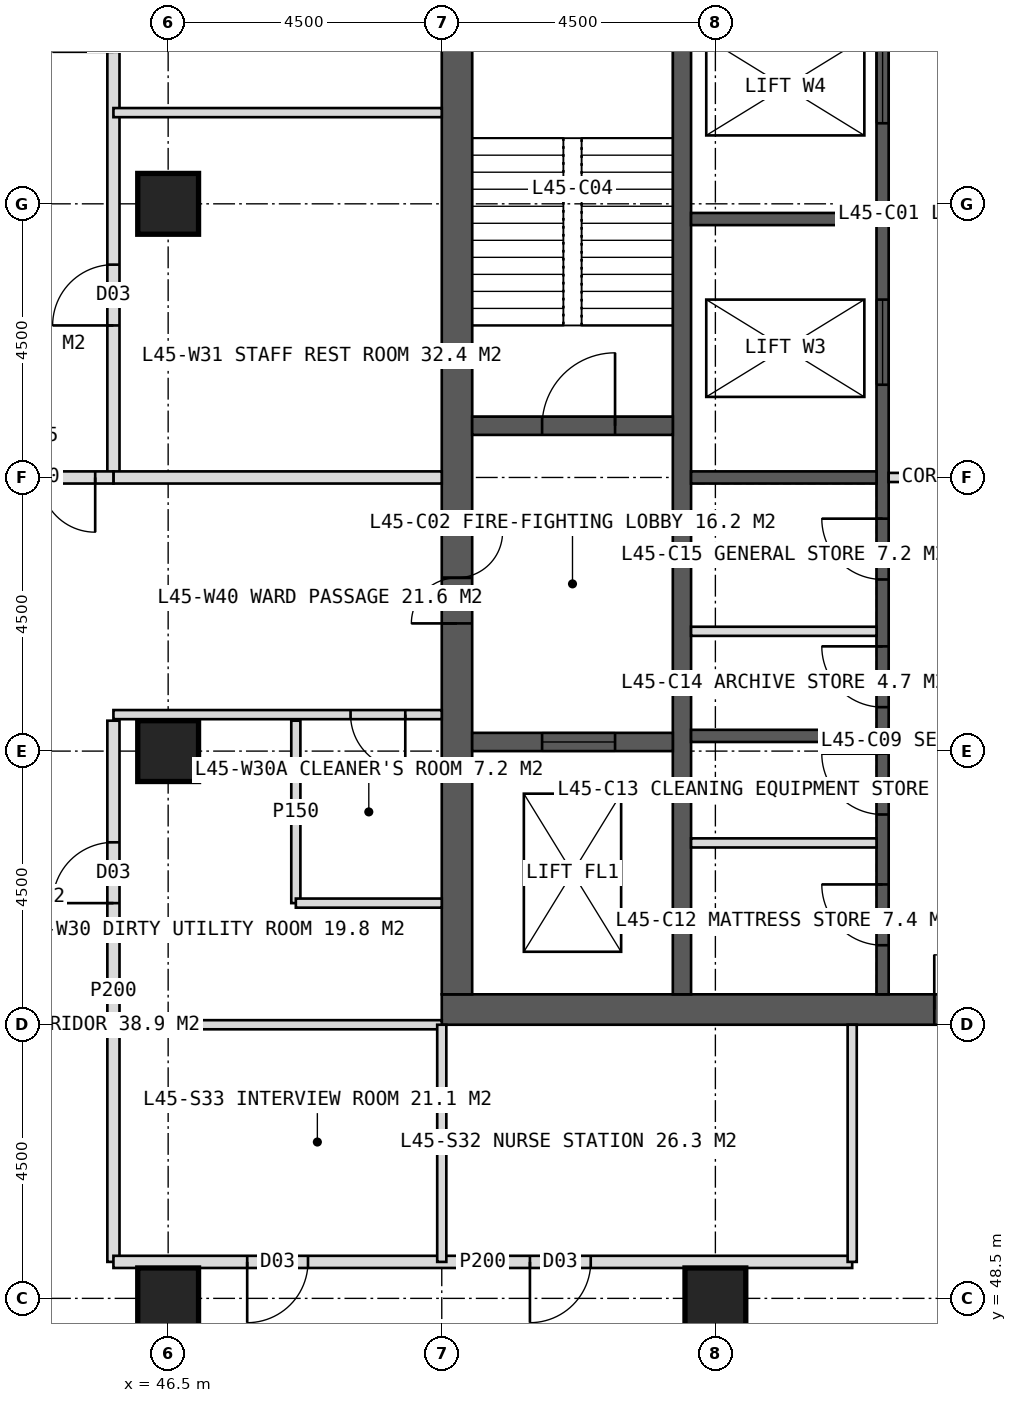
"""IFC4 building model, lengths in metres.
Left out: names, types, materials, properties, quantities, classifications, styles, units other than length and angle.
Written with IfcOpenShell. Run it as: python <this file> out.ifc"""

import sys

from ifc_helpers import new_model, si_unit, direction, frame, frame_2d, origin, origin_2d, place, context, subcontext, project, spatial, rectangle, hollow_rectangle, extrude, element, fill, save


model = new_model("IFC4")
c1 = context("Model", 3, precision=1e-05, world=origin(), true_north=direction((0.0, 1.0)))
c2 = subcontext(c1, "Body", "Model", "MODEL_VIEW")
j1 = project(units=[si_unit("LENGTHUNIT", "METRE"), si_unit("PLANEANGLEUNIT", "RADIAN")], contexts=[c1])
p1 = place(None, origin())
s1 = spatial("IfcSite", under=j1, at=p1, CompositionType="ELEMENT")
p2 = place(p1, origin())
s2 = spatial("IfcBuilding", under=s1, at=p2, CompositionType="ELEMENT")
p3 = place(p2, frame((0.0, 0.0, 189.0)))
s3 = spatial("IfcBuildingStorey", under=s2, at=p3, CompositionType="ELEMENT", Elevation=189.0)
p4 = place(p3, frame((51.0, 53.25, 0.0), z_axis=(0.0, 0.0, 1.0), x_axis=(1.0, 0.0, 0.0)))
e1 = element("IfcWall", 1, at=p4, inside=s3, PredefinedType="SHEAR", context=c2, shape_type="SweptSolid", body=[
    extrude(rectangle(XDim=18.0, YDim=0.5, at=frame_2d((9.0, 0.0))), origin(), (0.0, 0.0, 1.0), 4.0),
])
p5 = place(p4, frame((8.1, 0.0, 0.0)))
e2 = element("IfcOpeningElement", 2, at=p5, cuts=e1, PredefinedType="OPENING", context=c2, shape_type="SweptSolid", body=[
    extrude(rectangle(XDim=1.8, YDim=2.2, at=frame_2d((0.9, 1.1))), frame((0.0, 0.26, 0.0), z_axis=(0.0, -1.0, 0.0), x_axis=(1.0, 0.0, 0.0)), (0.0, 0.0, 1.0), 0.52),
])
p6 = place(p3, frame((51.25, 53.5, 0.0), z_axis=(0.0, 0.0, 1.0), x_axis=(0.0, 1.0, 0.0)))
e3 = element("IfcWall", 3, at=p6, inside=s3, PredefinedType="SHEAR", context=c2, shape_type="SweptSolid", body=[
    extrude(rectangle(XDim=17.0, YDim=0.5, at=frame_2d((8.5, 0.0))), origin(), (0.0, 0.0, 1.0), 4.0),
])
p7 = place(p6, frame((6.1, 0.0, 0.0)))
e4 = element("IfcOpeningElement", 4, at=p7, cuts=e3, PredefinedType="OPENING", context=c2, shape_type="SweptSolid", body=[
    extrude(rectangle(XDim=1.5, YDim=2.2, at=frame_2d((0.75, 1.1))), frame((0.0, 0.26, 0.0), z_axis=(0.0, -1.0, 0.0), x_axis=(1.0, 0.0, 0.0)), (0.0, 0.0, 1.0), 0.52),
])
p8 = place(p3, frame((54.95, 53.5, 0.0), z_axis=(0.0, 0.0, 1.0), x_axis=(0.0, 1.0, 0.0)))
e5 = element("IfcWall", 5, at=p8, inside=s3, PredefinedType="SHEAR", context=c2, shape_type="SweptSolid", body=[
    extrude(rectangle(XDim=17.0, YDim=0.3, at=frame_2d((8.5, 0.0))), origin(), (0.0, 0.0, 1.0), 4.0),
])
p9 = place(p3, frame((58.25, 53.5, 0.0), z_axis=(0.0, 0.0, 1.0), x_axis=(0.0, 1.0, 0.0)))
e6 = element("IfcWall", 6, at=p9, inside=s3, PredefinedType="SHEAR", context=c2, shape_type="SweptSolid", body=[
    extrude(rectangle(XDim=17.0, YDim=0.2, at=frame_2d((8.5, 0.0))), origin(), (0.0, 0.0, 1.0), 4.0),
])
p10 = place(p9, frame((0.808, 0.0, 0.0)))
e7 = element("IfcOpeningElement", 7, at=p10, cuts=e6, PredefinedType="OPENING", context=c2, shape_type="SweptSolid", body=[
    extrude(rectangle(XDim=1.0, YDim=2.1, at=frame_2d((0.5, 1.05))), frame((0.0, 0.11, 0.0), z_axis=(0.0, -1.0, 0.0), x_axis=(1.0, 0.0, 0.0)), (0.0, 0.0, 1.0), 0.22),
])
p11 = place(p9, frame((2.958, 0.0, 0.0)))
e8 = element("IfcOpeningElement", 8, at=p11, cuts=e6, PredefinedType="OPENING", context=c2, shape_type="SweptSolid", body=[
    extrude(rectangle(XDim=1.0, YDim=2.1, at=frame_2d((0.5, 1.05))), frame((0.0, 0.11, 0.0), z_axis=(0.0, -1.0, 0.0), x_axis=(1.0, 0.0, 0.0)), (0.0, 0.0, 1.0), 0.22),
])
p12 = place(p9, frame((4.722, 0.0, 0.0)))
e9 = element("IfcOpeningElement", 9, at=p12, cuts=e6, PredefinedType="OPENING", context=c2, shape_type="SweptSolid", body=[
    extrude(rectangle(XDim=1.0, YDim=2.1, at=frame_2d((0.5, 1.05))), frame((0.0, 0.11, 0.0), z_axis=(0.0, -1.0, 0.0), x_axis=(1.0, 0.0, 0.0)), (0.0, 0.0, 1.0), 0.22),
])
p13 = place(p9, frame((6.823, 0.0, 0.0)))
e10 = element("IfcOpeningElement", 10, at=p13, cuts=e6, PredefinedType="OPENING", context=c2, shape_type="SweptSolid", body=[
    extrude(rectangle(XDim=1.0, YDim=2.1, at=frame_2d((0.5, 1.05))), frame((0.0, 0.11, 0.0), z_axis=(0.0, -1.0, 0.0), x_axis=(1.0, 0.0, 0.0)), (0.0, 0.0, 1.0), 0.22),
])
p14 = place(p9, frame((10.025, 0.0, 0.0)))
e11 = element("IfcOpeningElement", 11, at=p14, cuts=e6, PredefinedType="OPENING", context=c2, shape_type="SweptSolid", body=[
    extrude(rectangle(XDim=1.4, YDim=2.2, at=frame_2d((0.7, 1.1))), frame((0.0, 0.11, 0.0), z_axis=(0.0, -1.0, 0.0), x_axis=(1.0, 0.0, 0.0)), (0.0, 0.0, 1.0), 0.22),
])
p15 = place(p9, frame((14.325, 0.0, 0.0)))
e12 = element("IfcOpeningElement", 12, at=p15, cuts=e6, PredefinedType="OPENING", context=c2, shape_type="SweptSolid", body=[
    extrude(rectangle(XDim=1.4, YDim=2.2, at=frame_2d((0.7, 1.1))), frame((0.0, 0.11, 0.0), z_axis=(0.0, -1.0, 0.0), x_axis=(1.0, 0.0, 0.0)), (0.0, 0.0, 1.0), 0.22),
])
for number, where, z_axis, x_axis in (
    (13, (55.1, 57.75, 0.0), (0.0, 0.0, 1.0), (1.0, 0.0, 0.0)),
    (14, (55.1, 62.0, 0.0), (0.0, 0.0, 1.0), (1.0, 0.0, 0.0)),
    (15, (55.1, 66.25, 0.0), (0.0, 0.0, 1.0), (1.0, 0.0, 0.0)),
):
    element("IfcWall", number, at=place(p3, frame(where, z_axis=z_axis, x_axis=x_axis)), inside=s3, PredefinedType="SHEAR", context=c2, shape_type="SweptSolid", body=[
        extrude(rectangle(XDim=3.05, YDim=0.2, at=frame_2d((1.525, 0.0))), origin(), (0.0, 0.0, 1.0), 4.0),
    ])
p16 = place(p3, frame((51.5, 62.85, 0.0), z_axis=(0.0, 0.0, 1.0), x_axis=(1.0, 0.0, 0.0)))
e16 = element("IfcWall", 16, at=p16, inside=s3, PredefinedType="SHEAR", context=c2, shape_type="SweptSolid", body=[
    extrude(rectangle(XDim=3.3, YDim=0.3, at=frame_2d((1.65, 0.0))), origin(), (0.0, 0.0, 1.0), 4.0),
])
p17 = place(p16, frame((1.15, 0.0, 0.0)))
e17 = element("IfcOpeningElement", 17, at=p17, cuts=e16, PredefinedType="OPENING", context=c2, shape_type="SweptSolid", body=[
    extrude(rectangle(XDim=1.2, YDim=2.1, at=frame_2d((0.6, 1.05))), frame((0.0, 0.16, 0.0), z_axis=(0.0, -1.0, 0.0), x_axis=(1.0, 0.0, 0.0)), (0.0, 0.0, 1.0), 0.32),
])
p18 = place(p3, frame((51.5, 57.65, 0.0), z_axis=(0.0, 0.0, 1.0), x_axis=(1.0, 0.0, 0.0)))
e18 = element("IfcWall", 18, at=p18, inside=s3, PredefinedType="SHEAR", context=c2, shape_type="SweptSolid", body=[
    extrude(rectangle(XDim=3.3, YDim=0.3, at=frame_2d((1.65, 0.0))), origin(), (0.0, 0.0, 1.0), 4.0),
])
p19 = place(p18, frame((1.15, 0.0, 0.0)))
e19 = element("IfcOpeningElement", 19, at=p19, cuts=e18, PredefinedType="OPENING", context=c2, shape_type="SweptSolid", body=[
    extrude(rectangle(XDim=1.2, YDim=2.2, at=frame_2d((0.6, 1.1))), frame((0.0, 0.16, 0.0), z_axis=(0.0, -1.0, 0.0), x_axis=(1.0, 0.0, 0.0)), (0.0, 0.0, 1.0), 0.32),
])
for number, where, z_axis, x_axis in (
    (20, (46.5, 48.5, 0.0), (0.0, 0.0, 1.0), (1.0, 0.0, 0.0)),
    (21, (55.5, 48.5, 0.0), (0.0, 0.0, 1.0), (1.0, 0.0, 0.0)),
    (22, (46.5, 57.5, 0.0), (0.0, 0.0, 1.0), (1.0, 0.0, 0.0)),
    (23, (46.5, 66.5, 0.0), (0.0, 0.0, 1.0), (1.0, 0.0, 0.0)),
):
    element("IfcColumn", number, at=place(p3, frame(where, z_axis=z_axis, x_axis=x_axis)), inside=s3, PredefinedType="COLUMN", context=c2, shape_type="SweptSolid", body=[
        extrude(hollow_rectangle(XDim=1.0, YDim=1.0, WallThickness=0.1, at=origin_2d()), origin(), (0.0, 0.0, 1.0), 4.0),
    ])
p20 = place(p3, frame((51.0, 53.0, 0.0), z_axis=(0.0, 0.0, 1.0), x_axis=(-1.0, 0.0, 0.0)))
e24 = element("IfcWall", 24, at=p20, inside=s3, PredefinedType="PARTITIONING", context=c2, shape_type="SweptSolid", body=[
    extrude(rectangle(XDim=5.4, YDim=0.15, at=frame_2d((2.7, 0.0))), origin(), (0.0, 0.0, 1.0), 3.75),
])
p21 = place(p3, frame((45.6, 49.1, 0.0), z_axis=(0.0, 0.0, 1.0), x_axis=(0.0, 1.0, 0.0)))
e25 = element("IfcWall", 25, at=p21, inside=s3, PredefinedType="PARTITIONING", context=c2, shape_type="SweptSolid", body=[
    extrude(rectangle(XDim=8.9, YDim=0.2, at=frame_2d((4.45, 0.0))), origin(), (0.0, 0.0, 1.0), 3.75),
])
p22 = place(p21, frame((5.9, 0.0, 0.0)))
e26 = element("IfcOpeningElement", 26, at=p22, cuts=e25, PredefinedType="OPENING", context=c2, shape_type="SweptSolid", body=[
    extrude(rectangle(XDim=1.0, YDim=2.1, at=frame_2d((0.5, 1.05))), frame((0.0, 0.11, 0.0), z_axis=(0.0, -1.0, 0.0), x_axis=(1.0, 0.0, 0.0)), (0.0, 0.0, 1.0), 0.22),
])
p23 = place(p3, frame((45.6, 62.0, 0.0), z_axis=(0.0, 0.0, 1.0), x_axis=(0.0, 1.0, 0.0)))
e27 = element("IfcWall", 27, at=p23, inside=s3, PredefinedType="PARTITIONING", context=c2, shape_type="SweptSolid", body=[
    extrude(rectangle(XDim=14.4, YDim=0.2, at=frame_2d((7.2, 0.0))), origin(), (0.0, 0.0, 1.0), 3.75),
])
p24 = place(p23, frame((2.5, 0.0, 0.0)))
e28 = element("IfcOpeningElement", 28, at=p24, cuts=e27, PredefinedType="OPENING", context=c2, shape_type="SweptSolid", body=[
    extrude(rectangle(XDim=1.0, YDim=2.1, at=frame_2d((0.5, 1.05))), frame((0.0, 0.11, 0.0), z_axis=(0.0, -1.0, 0.0), x_axis=(1.0, 0.0, 0.0)), (0.0, 0.0, 1.0), 0.22),
])
p25 = place(p23, frame((7.0, 0.0, 0.0)))
e29 = element("IfcOpeningElement", 29, at=p25, cuts=e27, PredefinedType="OPENING", context=c2, shape_type="SweptSolid", body=[
    extrude(rectangle(XDim=1.0, YDim=2.1, at=frame_2d((0.5, 1.05))), frame((0.0, 0.11, 0.0), z_axis=(0.0, -1.0, 0.0), x_axis=(1.0, 0.0, 0.0)), (0.0, 0.0, 1.0), 0.22),
])
p26 = place(p23, frame((11.2, 0.0, 0.0)))
e30 = element("IfcOpeningElement", 30, at=p26, cuts=e27, PredefinedType="OPENING", context=c2, shape_type="SweptSolid", body=[
    extrude(rectangle(XDim=1.0, YDim=2.1, at=frame_2d((0.5, 1.05))), frame((0.0, 0.11, 0.0), z_axis=(0.0, -1.0, 0.0), x_axis=(1.0, 0.0, 0.0)), (0.0, 0.0, 1.0), 0.22),
])
p27 = place(p3, frame((51.0, 58.1, 0.0), z_axis=(0.0, 0.0, 1.0), x_axis=(-1.0, 0.0, 0.0)))
e31 = element("IfcWall", 31, at=p27, inside=s3, PredefinedType="PARTITIONING", context=c2, shape_type="SweptSolid", body=[
    extrude(rectangle(XDim=5.4, YDim=0.15, at=frame_2d((2.7, 0.0))), origin(), (0.0, 0.0, 1.0), 3.75),
])
p28 = place(p27, frame((0.6, 0.0, 0.0)))
e32 = element("IfcOpeningElement", 32, at=p28, cuts=e31, PredefinedType="OPENING", context=c2, shape_type="SweptSolid", body=[
    extrude(rectangle(XDim=0.9, YDim=2.1, at=frame_2d((0.45, 1.05))), frame((0.0, 0.085, 0.0), z_axis=(0.0, -1.0, 0.0), x_axis=(1.0, 0.0, 0.0)), (0.0, 0.0, 1.0), 0.17),
])
p29 = place(p3, frame((51.0, 62.0, 0.0), z_axis=(0.0, 0.0, 1.0), x_axis=(-1.0, 0.0, 0.0)))
e33 = element("IfcWall", 33, at=p29, inside=s3, PredefinedType="SOLIDWALL", context=c2, shape_type="SweptSolid", body=[
    extrude(rectangle(XDim=5.4, YDim=0.2, at=frame_2d((2.7, 0.0))), origin(), (0.0, 0.0, 1.0), 2.95),
])
p30 = place(p3, frame((51.0, 68.0, 0.0), z_axis=(0.0, 0.0, 1.0), x_axis=(-1.0, 0.0, 0.0)))
e34 = element("IfcWall", 34, at=p30, inside=s3, PredefinedType="PARTITIONING", context=c2, shape_type="SweptSolid", body=[
    extrude(rectangle(XDim=5.4, YDim=0.15, at=frame_2d((2.7, 0.0))), origin(), (0.0, 0.0, 1.0), 3.75),
])
p31 = place(p3, frame((48.6, 55.0, 0.0), z_axis=(0.0, 0.0, 1.0), x_axis=(0.0, 1.0, 0.0)))
e35 = element("IfcWall", 35, at=p31, inside=s3, PredefinedType="PARTITIONING", context=c2, shape_type="SweptSolid", body=[
    extrude(rectangle(XDim=3.0, YDim=0.15, at=frame_2d((1.5, 0.0))), origin(), (0.0, 0.0, 1.0), 3.75),
])
p32 = place(p3, frame((51.0, 55.0, 0.0), z_axis=(0.0, 0.0, 1.0), x_axis=(-1.0, 0.0, 0.0)))
e36 = element("IfcWall", 36, at=p32, inside=s3, PredefinedType="PARTITIONING", context=c2, shape_type="SweptSolid", body=[
    extrude(rectangle(XDim=2.4, YDim=0.15, at=frame_2d((1.2, 0.0))), origin(), (0.0, 0.0, 1.0), 3.75),
])
p33 = place(p3, frame((57.75, 49.1, 0.0), z_axis=(0.0, 0.0, 1.0), x_axis=(-1.0, 0.0, 0.0)))
e37 = element("IfcWall", 37, at=p33, inside=s3, PredefinedType="PARTITIONING", context=c2, shape_type="SweptSolid", body=[
    extrude(rectangle(XDim=12.15, YDim=0.2, at=frame_2d((6.075, 0.0))), origin(), (0.0, 0.0, 1.0), 3.75),
])
p34 = place(p33, frame((4.3, 0.0, 0.0)))
e38 = element("IfcOpeningElement", 38, at=p34, cuts=e37, PredefinedType="OPENING", context=c2, shape_type="SweptSolid", body=[
    extrude(rectangle(XDim=1.0, YDim=2.1, at=frame_2d((0.5, 1.05))), frame((0.0, 0.11, 0.0), z_axis=(0.0, -1.0, 0.0), x_axis=(1.0, 0.0, 0.0)), (0.0, 0.0, 1.0), 0.22),
])
p35 = place(p33, frame((8.95, 0.0, 0.0)))
e39 = element("IfcOpeningElement", 39, at=p35, cuts=e37, PredefinedType="OPENING", context=c2, shape_type="SweptSolid", body=[
    extrude(rectangle(XDim=1.0, YDim=2.1, at=frame_2d((0.5, 1.05))), frame((0.0, 0.11, 0.0), z_axis=(0.0, -1.0, 0.0), x_axis=(1.0, 0.0, 0.0)), (0.0, 0.0, 1.0), 0.22),
])
for number, where, z_axis, x_axis in (
    (40, (57.75, 53.0, 0.0), (0.0, 0.0, 1.0), (0.0, -1.0, 0.0)),
    (41, (51.0, 53.0, 0.0), (0.0, 0.0, 1.0), (0.0, -1.0, 0.0)),
):
    element("IfcWall", number, at=place(p3, frame(where, z_axis=z_axis, x_axis=x_axis)), inside=s3, PredefinedType="PARTITIONING", context=c2, shape_type="SweptSolid", body=[
        extrude(rectangle(XDim=3.9, YDim=0.15, at=frame_2d((1.95, 0.0))), origin(), (0.0, 0.0, 1.0), 3.75),
    ])
p36 = place(p3, frame((45.6, 62.0, 0.0), z_axis=(0.0, 0.0, 1.0), x_axis=(-1.0, 0.0, 0.0)))
e42 = element("IfcWall", 42, at=p36, inside=s3, PredefinedType="SOLIDWALL", context=c2, shape_type="SweptSolid", body=[
    extrude(rectangle(XDim=2.7, YDim=0.2, at=frame_2d((1.35, 0.0))), origin(), (0.0, 0.0, 1.0), 2.95),
])
p37 = place(p36, frame((0.3, 0.0, 0.0)))
e43 = element("IfcOpeningElement", 43, at=p37, cuts=e42, PredefinedType="OPENING", context=c2, shape_type="SweptSolid", body=[
    extrude(rectangle(XDim=1.8, YDim=2.2, at=frame_2d((0.9, 1.1))), frame((0.0, 0.11, 0.0), z_axis=(0.0, -1.0, 0.0), x_axis=(1.0, 0.0, 0.0)), (0.0, 0.0, 1.0), 0.22),
])
for number, where, z_axis, x_axis in (
    (44, (55.1, 55.99, 0.0), (0.0, 0.0, 1.0), (1.0, 0.0, 0.0)),
    (45, (55.1, 59.47, 0.0), (0.0, 0.0, 1.0), (1.0, 0.0, 0.0)),
):
    element("IfcWall", number, at=place(p3, frame(where, z_axis=z_axis, x_axis=x_axis)), inside=s3, PredefinedType="PARTITIONING", context=c2, shape_type="SweptSolid", body=[
        extrude(rectangle(XDim=3.05, YDim=0.15, at=frame_2d((1.525, 0.0))), origin(), (0.0, 0.0, 1.0), 3.75),
    ])
p38 = place(p3, frame((58.35, 62.0, 0.0), z_axis=(0.0, 0.0, 1.0), x_axis=(1.0, 0.0, 0.0)))
e46 = element("IfcWall", 46, at=p38, inside=s3, PredefinedType="PARTITIONING", context=c2, shape_type="SweptSolid", body=[
    extrude(rectangle(XDim=3.3, YDim=0.15, at=frame_2d((1.65, 0.0))), origin(), (0.0, 0.0, 1.0), 3.75),
])
p39 = place(p28, origin())
e47 = element("IfcDoor", 47, at=p39, inside=s3, OperationType="SINGLE_SWING_LEFT", PredefinedType="DOOR", context=c2, shape_type="SweptSolid", body=[
    extrude(rectangle(XDim=0.9, YDim=2.1, at=frame_2d((0.45, 1.05))), frame((0.0, 0.025, 0.0), z_axis=(0.0, -1.0, 0.0), x_axis=(1.0, 0.0, 0.0)), (0.0, 0.0, 1.0), 0.05),
])
fill(e32, e47)
p40 = place(p22, origin())
e48 = element("IfcDoor", 48, at=p40, inside=s3, OperationType="SINGLE_SWING_LEFT", PredefinedType="DOOR", context=c2, shape_type="SweptSolid", body=[
    extrude(rectangle(XDim=1.0, YDim=2.1, at=frame_2d((0.5, 1.05))), frame((0.0, 0.025, 0.0), z_axis=(0.0, -1.0, 0.0), x_axis=(1.0, 0.0, 0.0)), (0.0, 0.0, 1.0), 0.05),
])
fill(e26, e48)
p41 = place(p24, origin())
e49 = element("IfcDoor", 49, at=p41, inside=s3, OperationType="SINGLE_SWING_LEFT", PredefinedType="DOOR", context=c2, shape_type="SweptSolid", body=[
    extrude(rectangle(XDim=1.0, YDim=2.1, at=frame_2d((0.5, 1.05))), frame((0.0, 0.025, 0.0), z_axis=(0.0, -1.0, 0.0), x_axis=(1.0, 0.0, 0.0)), (0.0, 0.0, 1.0), 0.05),
])
fill(e28, e49)
p42 = place(p34, origin())
e50 = element("IfcDoor", 50, at=p42, inside=s3, OperationType="SINGLE_SWING_RIGHT", PredefinedType="DOOR", context=c2, shape_type="SweptSolid", body=[
    extrude(rectangle(XDim=1.0, YDim=2.1, at=frame_2d((0.5, 1.05))), frame((0.0, 0.025, 0.0), z_axis=(0.0, -1.0, 0.0), x_axis=(1.0, 0.0, 0.0)), (0.0, 0.0, 1.0), 0.05),
])
fill(e38, e50)
p43 = place(p35, origin())
e51 = element("IfcDoor", 51, at=p43, inside=s3, OperationType="SINGLE_SWING_RIGHT", PredefinedType="DOOR", context=c2, shape_type="SweptSolid", body=[
    extrude(rectangle(XDim=1.0, YDim=2.1, at=frame_2d((0.5, 1.05))), frame((0.0, 0.025, 0.0), z_axis=(0.0, -1.0, 0.0), x_axis=(1.0, 0.0, 0.0)), (0.0, 0.0, 1.0), 0.05),
])
fill(e39, e51)
p44 = place(p37, origin())
e52 = element("IfcDoor", 52, at=p44, inside=s3, OperationType="DOUBLE_DOOR_DOUBLE_SWING", PredefinedType="DOOR", context=c2, shape_type="SweptSolid", body=[
    extrude(rectangle(XDim=1.8, YDim=2.2, at=frame_2d((0.9, 1.1))), frame((0.0, 0.025, 0.0), z_axis=(0.0, -1.0, 0.0), x_axis=(1.0, 0.0, 0.0)), (0.0, 0.0, 1.0), 0.05),
])
fill(e43, e52)
p45 = place(p7, origin())
e53 = element("IfcDoor", 53, at=p45, inside=s3, OperationType="DOUBLE_DOOR_SINGLE_SWING", PredefinedType="DOOR", context=c2, shape_type="SweptSolid", body=[
    extrude(rectangle(XDim=1.5, YDim=2.2, at=frame_2d((0.75, 1.1))), frame((0.0, 0.025, 0.0), z_axis=(0.0, -1.0, 0.0), x_axis=(1.0, 0.0, 0.0)), (0.0, 0.0, 1.0), 0.05),
])
fill(e4, e53)
p46 = place(p17, origin())
e54 = element("IfcDoor", 54, at=p46, inside=s3, OperationType="SINGLE_SWING_RIGHT", PredefinedType="DOOR", context=c2, shape_type="SweptSolid", body=[
    extrude(rectangle(XDim=1.2, YDim=2.1, at=frame_2d((0.6, 1.05))), frame((0.0, 0.025, 0.0), z_axis=(0.0, -1.0, 0.0), x_axis=(1.0, 0.0, 0.0)), (0.0, 0.0, 1.0), 0.05),
])
fill(e17, e54)
p47 = place(p19, origin())
e55 = element("IfcDoor", 55, at=p47, inside=s3, OperationType="SLIDING_TO_LEFT", PredefinedType="DOOR", context=c2, shape_type="SweptSolid", body=[
    extrude(rectangle(XDim=1.2, YDim=2.2, at=frame_2d((0.6, 1.1))), frame((0.0, 0.025, 0.0), z_axis=(0.0, -1.0, 0.0), x_axis=(1.0, 0.0, 0.0)), (0.0, 0.0, 1.0), 0.05),
])
fill(e19, e55)
p48 = place(p10, origin())
e56 = element("IfcDoor", 56, at=p48, inside=s3, OperationType="SINGLE_SWING_RIGHT", PredefinedType="DOOR", context=c2, shape_type="SweptSolid", body=[
    extrude(rectangle(XDim=1.0, YDim=2.1, at=frame_2d((0.5, 1.05))), frame((0.0, 0.025, 0.0), z_axis=(0.0, -1.0, 0.0), x_axis=(1.0, 0.0, 0.0)), (0.0, 0.0, 1.0), 0.05),
])
fill(e7, e56)
p49 = place(p11, origin())
e57 = element("IfcDoor", 57, at=p49, inside=s3, OperationType="SINGLE_SWING_RIGHT", PredefinedType="DOOR", context=c2, shape_type="SweptSolid", body=[
    extrude(rectangle(XDim=1.0, YDim=2.1, at=frame_2d((0.5, 1.05))), frame((0.0, 0.025, 0.0), z_axis=(0.0, -1.0, 0.0), x_axis=(1.0, 0.0, 0.0)), (0.0, 0.0, 1.0), 0.05),
])
fill(e8, e57)
p50 = place(p12, origin())
e58 = element("IfcDoor", 58, at=p50, inside=s3, OperationType="SINGLE_SWING_RIGHT", PredefinedType="DOOR", context=c2, shape_type="SweptSolid", body=[
    extrude(rectangle(XDim=1.0, YDim=2.1, at=frame_2d((0.5, 1.05))), frame((0.0, 0.025, 0.0), z_axis=(0.0, -1.0, 0.0), x_axis=(1.0, 0.0, 0.0)), (0.0, 0.0, 1.0), 0.05),
])
fill(e9, e58)
p51 = place(p13, origin())
e59 = element("IfcDoor", 59, at=p51, inside=s3, OperationType="SINGLE_SWING_RIGHT", PredefinedType="DOOR", context=c2, shape_type="SweptSolid", body=[
    extrude(rectangle(XDim=1.0, YDim=2.1, at=frame_2d((0.5, 1.05))), frame((0.0, 0.025, 0.0), z_axis=(0.0, -1.0, 0.0), x_axis=(1.0, 0.0, 0.0)), (0.0, 0.0, 1.0), 0.05),
])
fill(e10, e59)
p52 = place(p14, origin())
e60 = element("IfcDoor", 60, at=p52, inside=s3, OperationType="SLIDING_TO_LEFT", PredefinedType="DOOR", context=c2, shape_type="SweptSolid", body=[
    extrude(rectangle(XDim=1.4, YDim=2.2, at=frame_2d((0.7, 1.1))), frame((0.0, 0.025, 0.0), z_axis=(0.0, -1.0, 0.0), x_axis=(1.0, 0.0, 0.0)), (0.0, 0.0, 1.0), 0.05),
])
fill(e11, e60)
p53 = place(p15, origin())
e61 = element("IfcDoor", 61, at=p53, inside=s3, OperationType="SLIDING_TO_LEFT", PredefinedType="DOOR", context=c2, shape_type="SweptSolid", body=[
    extrude(rectangle(XDim=1.4, YDim=2.2, at=frame_2d((0.7, 1.1))), frame((0.0, 0.025, 0.0), z_axis=(0.0, -1.0, 0.0), x_axis=(1.0, 0.0, 0.0)), (0.0, 0.0, 1.0), 0.05),
])
fill(e12, e61)
p54 = place(p5, origin())
e62 = element("IfcDoor", 62, at=p54, inside=s3, OperationType="DOUBLE_DOOR_SINGLE_SWING", PredefinedType="DOOR", context=c2, shape_type="SweptSolid", body=[
    extrude(rectangle(XDim=1.8, YDim=2.2, at=frame_2d((0.9, 1.1))), frame((0.0, 0.025, 0.0), z_axis=(0.0, -1.0, 0.0), x_axis=(1.0, 0.0, 0.0)), (0.0, 0.0, 1.0), 0.05),
])
fill(e2, e62)
save(model, sys.argv[1])
